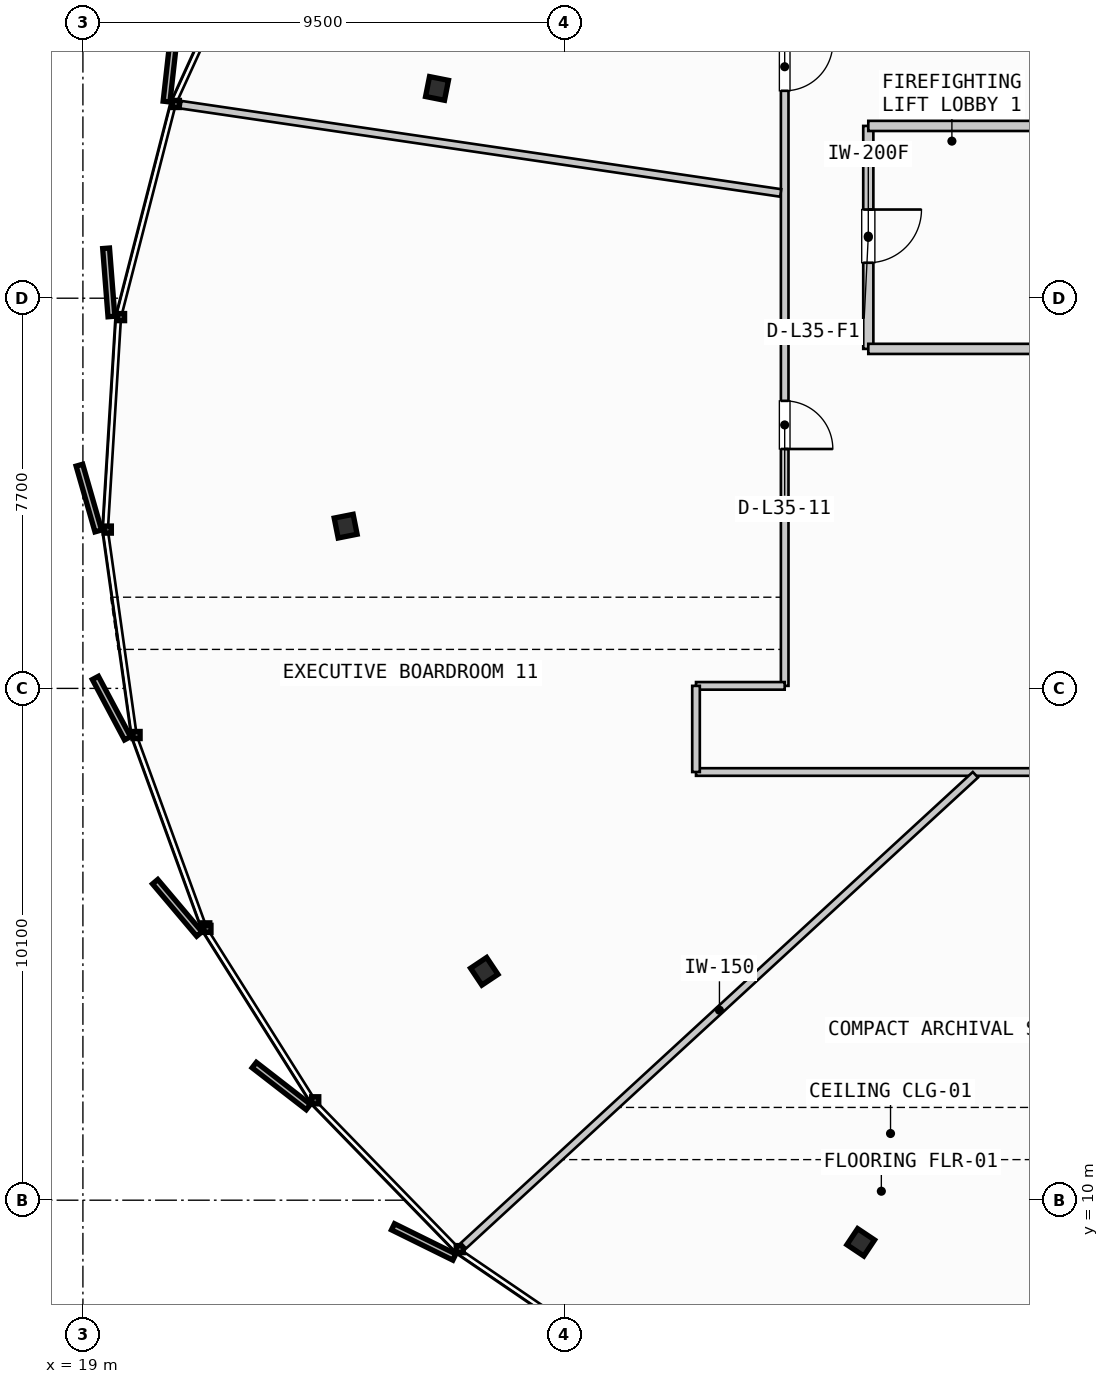
"""IFC4 building model, lengths in metres.
Left out: names, types, materials, properties, quantities, classifications, styles, units other than length and angle.
Written with IfcOpenShell. Run it as: python <this file> out.ifc"""

import sys

from ifc_helpers import new_model, si_unit, direction, frame, frame_2d, origin, origin_2d, place, context, subcontext, project, spatial, rectangle, i_section, extrude, source, transform, mapped, element, fill, save


model = new_model("IFC4")
c1 = context("Model", 3, precision=1e-05, world=origin(), true_north=direction((0.0, 1.0)))
c2 = subcontext(c1, "Body", "Model", "MODEL_VIEW")
j1 = project(units=[si_unit("LENGTHUNIT", "METRE"), si_unit("PLANEANGLEUNIT", "RADIAN")], contexts=[c1])
p1 = place(None, origin())
s1 = spatial("IfcSite", under=j1, at=p1, CompositionType="ELEMENT")
p2 = place(p1, origin())
s2 = spatial("IfcBuilding", under=s1, at=p2, CompositionType="ELEMENT")
p3 = place(p2, frame((0.0, 0.0, 139.45)))
s3 = spatial("IfcBuildingStorey", under=s2, at=p3, CompositionType="ELEMENT", Elevation=139.45)
m1 = source(origin(), c2, "Body", "SweptSolid", [
    extrude(i_section(OverallWidth=0.401, OverallDepth=0.381, WebThickness=0.032, FlangeThickness=0.051, FilletRadius=0.015, at=origin_2d()), origin(), (0.0, 0.0, 1.0), 3.3),
])
for number, where, z_axis, x_axis in (
    (1, (25.989, 31.94, 0.0), (0.0, 0.0, 1.0), (-0.981, 0.195, 0.0)),
    (2, (24.185, 23.302, 0.0), (0.0, 0.0, 1.0), (-0.981, -0.195, 0.0)),
    (3, (26.921, 14.517, 0.0), (0.0, 0.0, 1.0), (-0.831, -0.556, 0.0)),
    (4, (34.351, 9.168, 0.0), (0.0, 0.0, 1.0), (-0.556, -0.831, 0.0)),
):
    element("IfcColumn", number, at=place(p3, frame(where, z_axis=z_axis, x_axis=x_axis)), inside=s3, PredefinedType="COLUMN", context=c2, shape_type="MappedRepresentation", body=[
        mapped(m1, transform((0.0, 0.0, 0.0), scale=1.0)),
    ])
p4 = place(p3, frame((34.5, 31.2, 0.0), z_axis=(0.0, 0.0, 1.0), x_axis=(0.0, -1.0, 0.0)))
e5 = element("IfcWall", 5, at=p4, inside=s3, PredefinedType="PARTITIONING", context=c2, shape_type="SweptSolid", body=[
    extrude(rectangle(XDim=4.4, YDim=0.2, at=frame_2d((2.2, 0.0))), origin(), (0.0, 0.0, 1.0), 2.305),
])
p5 = place(p4, frame((1.65, 0.0, 0.0)))
e6 = element("IfcOpeningElement", 6, at=p5, cuts=e5, PredefinedType="OPENING", context=c2, shape_type="SweptSolid", body=[
    extrude(rectangle(XDim=1.05, YDim=2.15, at=frame_2d((0.525, 1.075))), frame((0.0, 0.11, 0.0), z_axis=(0.0, -1.0, 0.0), x_axis=(1.0, 0.0, 0.0)), (0.0, 0.0, 1.0), 0.22),
])
for number, where, z_axis, x_axis in (
    (7, (34.5, 26.8, 0.0), (0.0, 0.0, 1.0), (1.0, 0.0, 0.0)),
    (8, (34.5, 31.2, 0.0), (0.0, 0.0, 1.0), (1.0, 0.0, 0.0)),
):
    element("IfcWall", number, at=place(p3, frame(where, z_axis=z_axis, x_axis=x_axis)), inside=s3, PredefinedType="PARTITIONING", context=c2, shape_type="SweptSolid", body=[
        extrude(rectangle(XDim=3.215, YDim=0.2, at=frame_2d((1.607, 0.0))), origin(), (0.0, 0.0, 1.0), 2.305),
    ])
p6 = place(p3, frame((31.1, 18.45, 0.0), z_axis=(0.0, 0.0, 1.0), x_axis=(1.0, 0.0, 0.0)))
e9 = element("IfcWall", 9, at=p6, inside=s3, PredefinedType="PARTITIONING", context=c2, shape_type="SweptSolid", body=[
    extrude(rectangle(XDim=31.4, YDim=0.15, at=frame_2d((15.7, 0.0))), origin(), (0.0, 0.0, 1.0), 2.305),
])
p7 = place(p6, frame((8.433, 0.0, 0.0)))
e10 = element("IfcOpeningElement", 10, at=p7, cuts=e9, PredefinedType="OPENING", context=c2, shape_type="SweptSolid", body=[
    extrude(rectangle(XDim=0.95, YDim=2.15, at=frame_2d((0.475, 1.075))), frame((0.0, 0.085, 0.0), z_axis=(0.0, -1.0, 0.0), x_axis=(1.0, 0.0, 0.0)), (0.0, 0.0, 1.0), 0.17),
])
p8 = place(p6, frame((15.861, 0.0, 0.0)))
e11 = element("IfcOpeningElement", 11, at=p8, cuts=e9, PredefinedType="OPENING", context=c2, shape_type="SweptSolid", body=[
    extrude(rectangle(XDim=0.95, YDim=2.15, at=frame_2d((0.475, 1.075))), frame((0.0, 0.085, 0.0), z_axis=(0.0, -1.0, 0.0), x_axis=(1.0, 0.0, 0.0)), (0.0, 0.0, 1.0), 0.17),
])
p9 = place(p6, frame((23.234, 0.0, 0.0)))
e12 = element("IfcOpeningElement", 12, at=p9, cuts=e9, PredefinedType="OPENING", context=c2, shape_type="SweptSolid", body=[
    extrude(rectangle(XDim=0.95, YDim=2.15, at=frame_2d((0.475, 1.075))), frame((0.0, 0.085, 0.0), z_axis=(0.0, -1.0, 0.0), x_axis=(1.0, 0.0, 0.0)), (0.0, 0.0, 1.0), 0.17),
])
p10 = place(p6, frame((28.424, 0.0, 0.0)))
e13 = element("IfcOpeningElement", 13, at=p10, cuts=e9, PredefinedType="OPENING", context=c2, shape_type="SweptSolid", body=[
    extrude(rectangle(XDim=0.95, YDim=2.15, at=frame_2d((0.475, 1.075))), frame((0.0, 0.085, 0.0), z_axis=(0.0, -1.0, 0.0), x_axis=(1.0, 0.0, 0.0)), (0.0, 0.0, 1.0), 0.17),
])
p11 = place(p3, frame((32.85, 35.45, 0.0), z_axis=(0.0, 0.0, 1.0), x_axis=(0.0, -1.0, 0.0)))
e14 = element("IfcWall", 14, at=p11, inside=s3, PredefinedType="PARTITIONING", context=c2, shape_type="SweptSolid", body=[
    extrude(rectangle(XDim=15.3, YDim=0.15, at=frame_2d((7.65, 0.0))), origin(), (0.0, 0.0, 1.0), 2.305),
])
p12 = place(p11, frame((2.607, 0.0, 0.0)))
e15 = element("IfcOpeningElement", 15, at=p12, cuts=e14, PredefinedType="OPENING", context=c2, shape_type="SweptSolid", body=[
    extrude(rectangle(XDim=0.95, YDim=2.15, at=frame_2d((0.475, 1.075))), frame((0.0, 0.085, 0.0), z_axis=(0.0, -1.0, 0.0), x_axis=(1.0, 0.0, 0.0)), (0.0, 0.0, 1.0), 0.17),
])
p13 = place(p11, frame((9.676, 0.0, 0.0)))
e16 = element("IfcOpeningElement", 16, at=p13, cuts=e14, PredefinedType="OPENING", context=c2, shape_type="SweptSolid", body=[
    extrude(rectangle(XDim=0.95, YDim=2.15, at=frame_2d((0.475, 1.075))), frame((0.0, 0.085, 0.0), z_axis=(0.0, -1.0, 0.0), x_axis=(1.0, 0.0, 0.0)), (0.0, 0.0, 1.0), 0.17),
])
p14 = place(p3, frame((32.85, 20.15, 0.0), z_axis=(0.0, 0.0, 1.0), x_axis=(-1.0, 0.0, 0.0)))
e17 = element("IfcWall", 17, at=p14, inside=s3, PredefinedType="PARTITIONING", context=c2, shape_type="SweptSolid", body=[
    extrude(rectangle(XDim=1.75, YDim=0.15, at=frame_2d((0.875, 0.0))), origin(), (0.0, 0.0, 1.0), 2.305),
])
p15 = place(p3, frame((31.1, 20.15, 0.0), z_axis=(0.0, 0.0, 1.0), x_axis=(0.0, -1.0, 0.0)))
e18 = element("IfcWall", 18, at=p15, inside=s3, PredefinedType="PARTITIONING", context=c2, shape_type="SweptSolid", body=[
    extrude(rectangle(XDim=1.7, YDim=0.15, at=frame_2d((0.85, 0.0))), origin(), (0.0, 0.0, 1.0), 2.305),
])
p16 = place(p3, frame((36.614, 18.396, 0.0), z_axis=(0.0, 0.0, 1.0), x_axis=(-0.735962913831, -0.677021853019, 0.0)))
e19 = element("IfcWall", 19, at=p16, inside=s3, PredefinedType="PARTITIONING", context=c2, shape_type="SweptSolid", body=[
    extrude(rectangle(XDim=13.727, YDim=0.15, at=frame_2d((6.864, 0.0))), origin(), (0.0, 0.0, 1.0), 2.305),
])
p17 = place(p3, frame((32.771, 29.877, 0.0), z_axis=(0.0, 0.0, 1.0), x_axis=(-0.98934824772, 0.145568007244, 0.0)))
e20 = element("IfcWall", 20, at=p17, inside=s3, PredefinedType="PARTITIONING", context=c2, shape_type="SweptSolid", body=[
    extrude(rectangle(XDim=11.965, YDim=0.15, at=frame_2d((5.982, 0.0))), origin(), (0.0, 0.0, 1.0), 2.305),
])
m2 = source(origin(), c2, "Body", "SweptSolid", [
    extrude(rectangle(XDim=1.05, YDim=2.15, at=frame_2d((0.525, 1.075))), frame((0.0, 0.025, 0.0), z_axis=(0.0, -1.0, 0.0), x_axis=(1.0, 0.0, 0.0)), (0.0, 0.0, 1.0), 0.05),
])
p18 = place(p5, origin())
e21 = element("IfcDoor", 21, at=p18, inside=s3, OperationType="SINGLE_SWING_LEFT", PredefinedType="DOOR", context=c2, shape_type="MappedRepresentation", body=[
    mapped(m2, transform((0.0, 0.0, 0.0), scale=1.0)),
])
fill(e6, e21)
m3 = source(origin(), c2, "Body", "SweptSolid", [
    extrude(rectangle(XDim=0.95, YDim=2.15, at=frame_2d((0.475, 1.075))), frame((0.0, 0.025, 0.0), z_axis=(0.0, -1.0, 0.0), x_axis=(1.0, 0.0, 0.0)), (0.0, 0.0, 1.0), 0.05),
])
p19 = place(p12, origin())
e22 = element("IfcDoor", 22, at=p19, inside=s3, OperationType="SINGLE_SWING_LEFT", PredefinedType="DOOR", context=c2, shape_type="MappedRepresentation", body=[
    mapped(m3, transform((0.0, 0.0, 0.0), scale=1.0)),
])
fill(e15, e22)
p20 = place(p13, origin())
e23 = element("IfcDoor", 23, at=p20, inside=s3, OperationType="SINGLE_SWING_RIGHT", PredefinedType="DOOR", context=c2, shape_type="MappedRepresentation", body=[
    mapped(m3, transform((0.0, 0.0, 0.0), scale=1.0)),
])
fill(e16, e23)
save(model, sys.argv[1])
